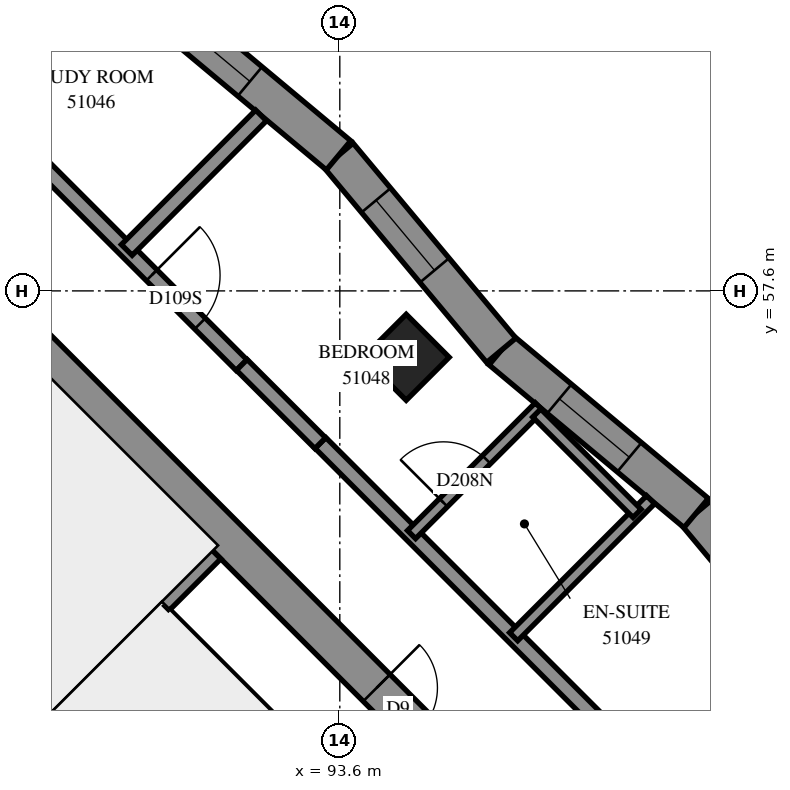
"""IFC4 building model, lengths in metres.
Left out: names, types, materials, properties, quantities, classifications, styles, units other than length and angle.
Written with IfcOpenShell. Run it as: python <this file> out.ifc"""

import sys

from ifc_helpers import new_model, si_unit, direction, frame, frame_2d, origin, origin_2d, place, context, subcontext, project, spatial, polyline, rectangle, outline, extrude, element, fill, save


model = new_model("IFC4")
c1 = context("Model", 3, precision=1e-05, world=origin(), true_north=direction((0.0, 1.0)))
c2 = subcontext(c1, "Body", "Model", "MODEL_VIEW")
j1 = project(units=[si_unit("LENGTHUNIT", "METRE"), si_unit("PLANEANGLEUNIT", "RADIAN")], contexts=[c1])
p1 = place(None, origin())
s1 = spatial("IfcSite", under=j1, at=p1, CompositionType="ELEMENT")
p2 = place(p1, origin())
s2 = spatial("IfcBuilding", under=s1, at=p2, CompositionType="ELEMENT")
p3 = place(p2, frame((0.0, 0.0, 189.6)))
s3 = spatial("IfcBuildingStorey", under=s2, at=p3, CompositionType="ELEMENT", Elevation=189.6)
p4 = place(p3, frame((94.474, 56.727, 0.0), z_axis=(0.0, 0.0, 1.0), x_axis=(0.7071067812, -0.7071067812, 0.0)))
e1 = element("IfcColumn", 1, at=p4, inside=s3, PredefinedType="COLUMN", context=c2, shape_type="SweptSolid", body=[
    extrude(rectangle(XDim=0.8, YDim=0.8, at=origin_2d()), origin(), (0.0, 0.0, 1.0), 3.1),
])
p5 = place(p3, frame((86.66, 59.802, -0.3), z_axis=(0.0, 0.0, 1.0), x_axis=(0.7071067812, -0.7071067812, 0.0)))
e2 = element("IfcWall", 2, at=p5, inside=s3, PredefinedType="SHEAR", context=c2, shape_type="SweptSolid", body=[
    extrude(rectangle(XDim=15.4, YDim=0.5, at=frame_2d((7.7, 0.0))), origin(), (0.0, 0.0, 1.0), 2.7),
])
p6 = place(p5, frame((10.5, 0.0, 0.3)))
e3 = element("IfcOpeningElement", 3, at=p6, cuts=e2, PredefinedType="OPENING", context=c2, shape_type="SweptSolid", body=[
    extrude(rectangle(XDim=0.8, YDim=2.1, at=frame_2d((0.4, 1.05))), frame((0.0, 0.26, 0.0), z_axis=(0.0, -1.0, 0.0), x_axis=(1.0, 0.0, 0.0)), (0.0, 0.0, 1.0), 0.52),
])
p7 = place(p3, frame((81.534, 53.969, 0.0), z_axis=(0.0, 0.0, 1.0), x_axis=(0.707103309, -0.7071102534, 0.0)))
e4 = element("IfcWall", 4, at=p7, inside=s3, PredefinedType="SOLIDWALL", context=c2, shape_type="SweptSolid", body=[
    extrude(rectangle(XDim=14.4, YDim=0.3, at=frame_2d((7.2, 0.0))), origin(), (0.0, 0.0, 1.0), 3.1),
])
p8 = place(p7, frame((1.25, 0.0, 0.0)))
e5 = element("IfcOpeningElement", 5, at=p8, cuts=e4, PredefinedType="OPENING", context=c2, shape_type="SweptSolid", body=[
    extrude(rectangle(XDim=1.1, YDim=2.1, at=frame_2d((0.55, 1.05))), frame((0.0, 0.16, 0.0), z_axis=(0.0, -1.0, 0.0), x_axis=(1.0, 0.0, 0.0)), (0.0, 0.0, 1.0), 0.32),
])
p9 = place(p7, frame((4.85, 0.0, 0.0)))
e6 = element("IfcOpeningElement", 6, at=p9, cuts=e4, PredefinedType="OPENING", context=c2, shape_type="SweptSolid", body=[
    extrude(rectangle(XDim=1.1, YDim=2.1, at=frame_2d((0.55, 1.05))), frame((0.0, 0.16, 0.0), z_axis=(0.0, -1.0, 0.0), x_axis=(1.0, 0.0, 0.0)), (0.0, 0.0, 1.0), 0.32),
])
p10 = place(p7, frame((8.45, 0.0, 0.0)))
e7 = element("IfcOpeningElement", 7, at=p10, cuts=e4, PredefinedType="OPENING", context=c2, shape_type="SweptSolid", body=[
    extrude(rectangle(XDim=1.1, YDim=2.1, at=frame_2d((0.55, 1.05))), frame((0.0, 0.16, 0.0), z_axis=(0.0, -1.0, 0.0), x_axis=(1.0, 0.0, 0.0)), (0.0, 0.0, 1.0), 0.32),
])
p11 = place(p7, frame((12.05, 0.0, 0.0)))
e8 = element("IfcOpeningElement", 8, at=p11, cuts=e4, PredefinedType="OPENING", context=c2, shape_type="SweptSolid", body=[
    extrude(rectangle(XDim=1.1, YDim=2.1, at=frame_2d((0.55, 1.05))), frame((0.0, 0.16, 0.0), z_axis=(0.0, -1.0, 0.0), x_axis=(1.0, 0.0, 0.0)), (0.0, 0.0, 1.0), 0.32),
])
p12 = place(p3, frame((88.958, 51.211, 0.0), z_axis=(0.0, 0.0, 1.0), x_axis=(0.7071067812, 0.7071067812, 0.0)))
e9 = element("IfcWall", 9, at=p12, inside=s3, PredefinedType="SOLIDWALL", context=c2, shape_type="SweptSolid", body=[
    extrude(rectangle(XDim=4.2, YDim=0.3, at=frame_2d((2.1, 0.0))), origin(), (0.0, 0.0, 1.0), 3.1),
])
p13 = place(p3, frame((100.443, 52.096, 0.0), z_axis=(0.0, 0.0, 1.0), x_axis=(-0.6407429217, 0.7677555003, 0.0)))
e10 = element("IfcWall", 10, at=p13, inside=s3, PredefinedType="SOLIDWALL", context=c2, shape_type="SweptSolid", body=[
    extrude(outline(polyline([(0.045, -0.25), (3.385, -0.25), (3.34, 0.25), (-0.045, 0.25), (0.045, -0.25)])), origin(), (0.0, 0.0, 1.0), 3.1),
])
p14 = place(p13, frame((1.07, 0.0, 0.45)))
e11 = element("IfcOpeningElement", 11, at=p14, cuts=e10, PredefinedType="OPENING", context=c2, shape_type="SweptSolid", body=[
    extrude(rectangle(XDim=1.2, YDim=2.5, at=frame_2d((0.6, 1.25))), frame((0.0, 0.26, 0.0), z_axis=(0.0, -1.0, 0.0), x_axis=(1.0, 0.0, 0.0)), (0.0, 0.0, 1.0), 0.52),
])
p15 = place(p3, frame((98.288, 54.678, 0.0), z_axis=(0.0, 0.0, 1.0), x_axis=(-0.7677573222, 0.6407407387, 0.0)))
e12 = element("IfcWall", 12, at=p15, inside=s3, PredefinedType="SOLIDWALL", context=c2, shape_type="SweptSolid", body=[
    extrude(outline(polyline([(-0.022, -0.25), (3.318, -0.25), (3.363, 0.25), (0.022, 0.25), (-0.022, -0.25)])), origin(), (0.0, 0.0, 1.0), 3.1),
])
p16 = place(p15, frame((1.144, 0.0, 0.45)))
e13 = element("IfcOpeningElement", 13, at=p16, cuts=e12, PredefinedType="OPENING", context=c2, shape_type="SweptSolid", body=[
    extrude(rectangle(XDim=1.2, YDim=2.5, at=frame_2d((0.6, 1.25))), frame((0.0, 0.26, 0.0), z_axis=(0.0, -1.0, 0.0), x_axis=(1.0, 0.0, 0.0)), (0.0, 0.0, 1.0), 0.52),
])
p17 = place(p3, frame((95.724, 56.818, 0.0), z_axis=(0.0, 0.0, 1.0), x_axis=(-0.6407407387, 0.7677573222, 0.0)))
e14 = element("IfcWall", 14, at=p17, inside=s3, PredefinedType="SOLIDWALL", context=c2, shape_type="SweptSolid", body=[
    extrude(outline(polyline([(0.022, -0.25), (3.363, -0.25), (3.318, 0.25), (-0.022, 0.25), (0.022, -0.25)])), origin(), (0.0, 0.0, 1.0), 3.1),
])
p18 = place(p17, frame((1.37, 0.0, 0.45)))
e15 = element("IfcOpeningElement", 15, at=p18, cuts=e14, PredefinedType="OPENING", context=c2, shape_type="SweptSolid", body=[
    extrude(rectangle(XDim=1.2, YDim=2.5, at=frame_2d((0.6, 1.25))), frame((0.0, 0.26, 0.0), z_axis=(0.0, -1.0, 0.0), x_axis=(1.0, 0.0, 0.0)), (0.0, 0.0, 1.0), 0.52),
])
p19 = place(p3, frame((93.583, 59.383, 0.0), z_axis=(0.0, 0.0, 1.0), x_axis=(-0.7677450318, 0.6407554652, 0.0)))
e16 = element("IfcWall", 16, at=p19, inside=s3, PredefinedType="SOLIDWALL", context=c2, shape_type="SweptSolid", body=[
    extrude(outline(polyline([(-0.022, -0.25), (3.318, -0.25), (3.363, 0.25), (0.022, 0.25), (-0.022, -0.25)])), origin(), (0.0, 0.0, 1.0), 3.1),
])
p20 = place(p19, frame((1.518, 0.0, 0.45)))
e17 = element("IfcOpeningElement", 17, at=p20, cuts=e16, PredefinedType="OPENING", context=c2, shape_type="SweptSolid", body=[
    extrude(rectangle(XDim=1.2, YDim=2.5, at=frame_2d((0.6, 1.25))), frame((0.0, 0.26, 0.0), z_axis=(0.0, -1.0, 0.0), x_axis=(1.0, 0.0, 0.0)), (0.0, 0.0, 1.0), 0.52),
])
p21 = place(p3, frame((91.313, 53.354, 0.0), z_axis=(0.0, 0.0, 1.0), x_axis=(0.7071147811, -0.7070987812, 0.0)))
e18 = element("IfcWall", 18, at=p21, inside=s3, PredefinedType="PARTITIONING", context=c2, shape_type="SweptSolid", body=[
    extrude(rectangle(XDim=6.25, YDim=0.15, at=frame_2d((3.125, 0.0))), origin(), (0.0, 0.0, 1.0), 3.1),
])
p22 = place(p3, frame((93.346, 55.599, 0.0), z_axis=(0.0, 0.0, 1.0), x_axis=(0.7071067812, -0.7071067812, 0.0)))
e19 = element("IfcWall", 19, at=p22, inside=s3, PredefinedType="PARTITIONING", context=c2, shape_type="SweptSolid", body=[
    extrude(rectangle(XDim=9.201, YDim=0.2, at=frame_2d((4.601, 0.0))), origin(), (0.0, 0.0, 1.0), 3.1),
])
p23 = place(p3, frame((88.247, 60.683, 0.0), z_axis=(0.0, 0.0, 1.0), x_axis=(0.7071067812, -0.7071067812, 0.0)))
e20 = element("IfcWall", 20, at=p23, inside=s3, PredefinedType="PARTITIONING", context=c2, shape_type="SweptSolid", body=[
    extrude(rectangle(XDim=5.742, YDim=0.2, at=frame_2d((2.871, 0.0))), origin(), (0.0, 0.0, 1.0), 3.1),
])
p24 = place(p23, frame((4.069, 0.0, 0.0)))
e21 = element("IfcOpeningElement", 21, at=p24, cuts=e20, PredefinedType="OPENING", context=c2, shape_type="SweptSolid", body=[
    extrude(rectangle(XDim=0.9, YDim=2.1, at=frame_2d((0.45, 1.05))), frame((0.0, 0.11, 0.0), z_axis=(0.0, -1.0, 0.0), x_axis=(1.0, 0.0, 0.0)), (0.0, 0.0, 1.0), 0.22),
])
p25 = place(p3, frame((95.887, 53.051, 0.0), z_axis=(0.0, 0.0, 1.0), x_axis=(0.7071067812, 0.7071067812, 0.0)))
e22 = element("IfcWall", 22, at=p25, inside=s3, PredefinedType="PARTITIONING", context=c2, shape_type="SweptSolid", body=[
    extrude(rectangle(XDim=2.548, YDim=0.15, at=frame_2d((1.274, 0.0))), origin(), (0.0, 0.0, 1.0), 3.1),
])
p26 = place(p3, frame((90.797, 58.139, 0.0), z_axis=(0.0, 0.0, 1.0), x_axis=(0.7066467053, 0.7075665579, 0.0)))
e23 = element("IfcWall", 23, at=p26, inside=s3, PredefinedType="PARTITIONING", context=c2, shape_type="SweptSolid", body=[
    extrude(rectangle(XDim=2.5, YDim=0.2, at=frame_2d((1.25, 0.0))), origin(), (0.0, 0.0, 1.0), 3.1),
])
p27 = place(p3, frame((94.544, 54.394, 0.0), z_axis=(0.0, 0.0, 1.0), x_axis=(0.7070857442, 0.7071278176, 0.0)))
e24 = element("IfcWall", 24, at=p27, inside=s3, PredefinedType="PARTITIONING", context=c2, shape_type="SweptSolid", body=[
    extrude(rectangle(XDim=2.377, YDim=0.15, at=frame_2d((1.188, 0.0))), origin(), (0.0, 0.0, 1.0), 3.1),
])
p28 = place(p27, frame((0.594, 0.0, 0.0)))
e25 = element("IfcOpeningElement", 25, at=p28, cuts=e24, PredefinedType="OPENING", context=c2, shape_type="SweptSolid", body=[
    extrude(rectangle(XDim=0.8, YDim=2.1, at=frame_2d((0.4, 1.05))), frame((0.0, 0.085, 0.0), z_axis=(0.0, -1.0, 0.0), x_axis=(1.0, 0.0, 0.0)), (0.0, 0.0, 1.0), 0.17),
])
p29 = place(p3, frame((96.191, 55.993, 0.0), z_axis=(0.0, 0.0, 1.0), x_axis=(0.7071067812, -0.7071067812, 0.0)))
e26 = element("IfcWall", 26, at=p29, inside=s3, PredefinedType="PARTITIONING", context=c2, shape_type="SweptSolid", body=[
    extrude(rectangle(XDim=1.867, YDim=0.15, at=frame_2d((0.933, 0.0))), origin(), (0.0, 0.0, 1.0), 3.1),
])
p30 = place(p3, frame((92.311, 56.627, 0.0), z_axis=(0.0, 0.0, 1.0), x_axis=(0.7077922938, -0.7064206033, 0.0)))
e27 = element("IfcWall", 27, at=p30, inside=s3, PredefinedType="PARTITIONING", context=c2, shape_type="SweptSolid", body=[
    extrude(rectangle(XDim=1.458, YDim=0.2, at=frame_2d((0.729, 0.0))), origin(), (0.0, 0.0, 1.0), 3.1),
])
p31 = place(p16, origin())
e28 = element("IfcWindow", 28, at=p31, inside=s3, PartitioningType="SINGLE_PANEL", PredefinedType="WINDOW", context=c2, shape_type="SweptSolid", body=[
    extrude(rectangle(XDim=1.2, YDim=2.5, at=frame_2d((0.6, 1.25))), frame((0.0, 0.18, 0.0), z_axis=(0.0, -1.0, 0.0), x_axis=(1.0, 0.0, 0.0)), (0.0, 0.0, 1.0), 0.06),
])
fill(e13, e28)
p32 = place(p18, origin())
e29 = element("IfcWindow", 29, at=p32, inside=s3, PartitioningType="SINGLE_PANEL", PredefinedType="WINDOW", context=c2, shape_type="SweptSolid", body=[
    extrude(rectangle(XDim=1.2, YDim=2.5, at=frame_2d((0.6, 1.25))), frame((0.0, 0.18, 0.0), z_axis=(0.0, -1.0, 0.0), x_axis=(1.0, 0.0, 0.0)), (0.0, 0.0, 1.0), 0.06),
])
fill(e15, e29)
p33 = place(p20, origin())
e30 = element("IfcWindow", 30, at=p33, inside=s3, PartitioningType="SINGLE_PANEL", PredefinedType="WINDOW", context=c2, shape_type="SweptSolid", body=[
    extrude(rectangle(XDim=1.2, YDim=2.5, at=frame_2d((0.6, 1.25))), frame((0.0, 0.18, 0.0), z_axis=(0.0, -1.0, 0.0), x_axis=(1.0, 0.0, 0.0)), (0.0, 0.0, 1.0), 0.06),
])
fill(e17, e30)
p34 = place(p6, origin())
e31 = element("IfcDoor", 31, at=p34, inside=s3, OperationType="SINGLE_SWING_RIGHT", PredefinedType="DOOR", context=c2, shape_type="SweptSolid", body=[
    extrude(rectangle(XDim=0.8, YDim=2.1, at=frame_2d((0.4, 1.05))), frame((0.0, 0.025, 0.0), z_axis=(0.0, -1.0, 0.0), x_axis=(1.0, 0.0, 0.0)), (0.0, 0.0, 1.0), 0.05),
])
fill(e3, e31)
p35 = place(p24, origin())
e32 = element("IfcDoor", 32, at=p35, inside=s3, OperationType="SINGLE_SWING_RIGHT", PredefinedType="DOOR", context=c2, shape_type="SweptSolid", body=[
    extrude(rectangle(XDim=0.9, YDim=2.1, at=frame_2d((0.45, 1.05))), frame((0.0, 0.025, 0.0), z_axis=(0.0, -1.0, 0.0), x_axis=(1.0, 0.0, 0.0)), (0.0, 0.0, 1.0), 0.05),
])
fill(e21, e32)
p36 = place(p28, origin())
e33 = element("IfcDoor", 33, at=p36, inside=s3, OperationType="SINGLE_SWING_RIGHT", PredefinedType="DOOR", context=c2, shape_type="SweptSolid", body=[
    extrude(rectangle(XDim=0.8, YDim=2.1, at=frame_2d((0.4, 1.05))), frame((0.0, 0.025, 0.0), z_axis=(0.0, -1.0, 0.0), x_axis=(1.0, 0.0, 0.0)), (0.0, 0.0, 1.0), 0.05),
])
fill(e25, e33)
save(model, sys.argv[1])
